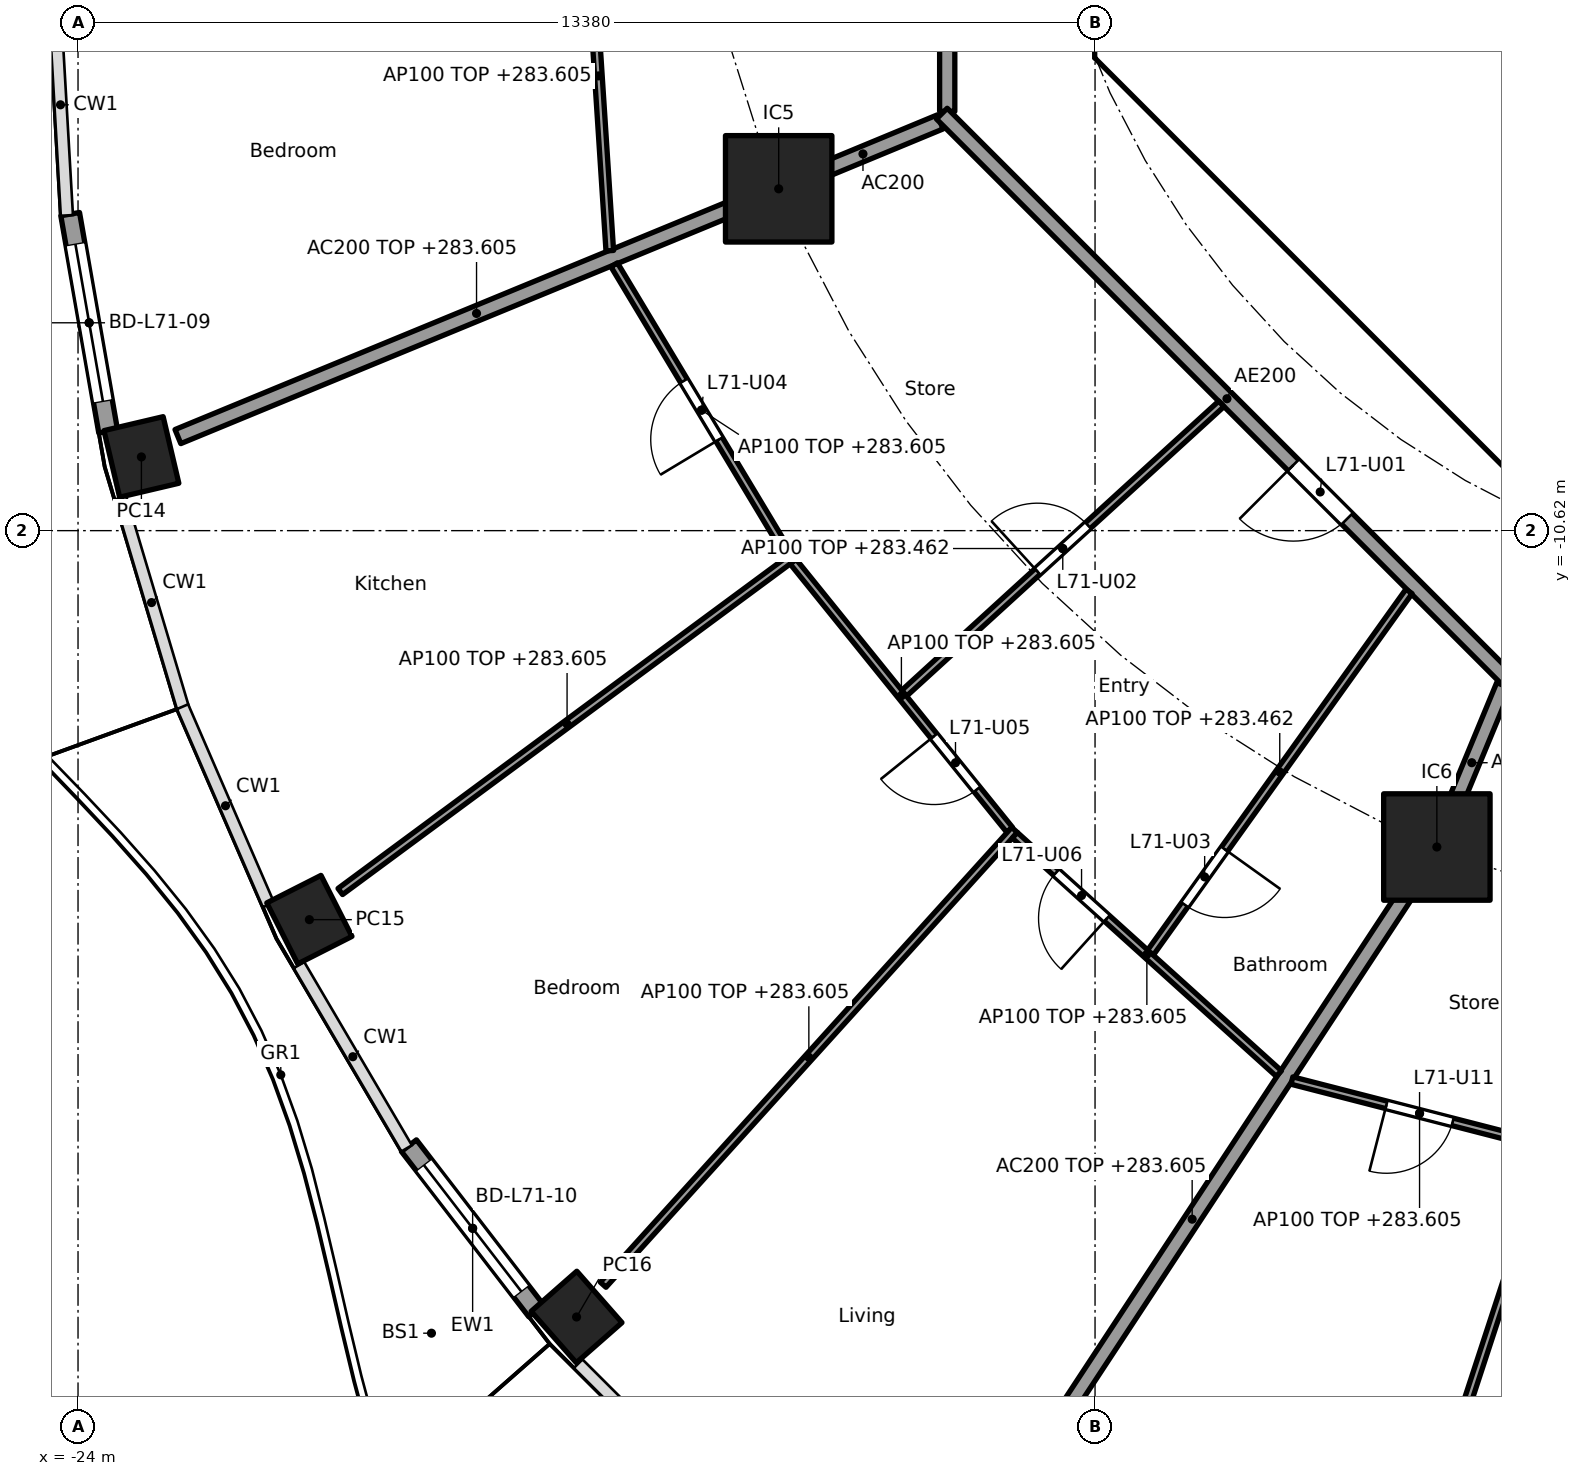
"""IFC4 building model, lengths in metres.
Left out: names, types, materials, properties, quantities, classifications, styles, units other than length and angle.
Written with IfcOpenShell. Run it as: python <this file> out.ifc"""

import sys

from ifc_helpers import new_model, si_unit, direction, frame, frame_2d, origin, origin_2d, place, context, subcontext, project, spatial, polyline, rectangle, hollow_rectangle, outline, extrude, element, fill, save


model = new_model("IFC4")
c1 = context("Model", 3, precision=1e-05, world=origin(), true_north=direction((0.0, 1.0)))
c2 = subcontext(c1, "Body", "Model", "MODEL_VIEW")
j1 = project(units=[si_unit("LENGTHUNIT", "METRE"), si_unit("PLANEANGLEUNIT", "RADIAN")], contexts=[c1])
p1 = place(None, origin())
s1 = spatial("IfcSite", under=j1, at=p1, CompositionType="ELEMENT")
p2 = place(p1, origin())
s2 = spatial("IfcBuilding", under=s1, at=p2, CompositionType="ELEMENT")
p3 = place(p2, frame((0.0, 0.0, 280.7)))
s3 = spatial("IfcBuildingStorey", under=s2, at=p3, CompositionType="ELEMENT", Elevation=280.7)
for number, where, z_axis, x_axis in (
    (1, (-23.166, -9.65, 0.0), (0.0, 0.0, 1.0), (0.229, -0.973, 0.0)),
    (2, (-20.957, -15.738, 0.0), (0.0, 0.0, 1.0), (0.452, -0.892, 0.0)),
    (3, (-17.441, -20.965, 0.0), (0.0, 0.0, 1.0), (0.66, -0.751, 0.0)),
):
    element("IfcColumn", number, at=place(p3, frame(where, z_axis=z_axis, x_axis=x_axis)), inside=s3, PredefinedType="COLUMN", context=c2, shape_type="SweptSolid", body=[
        extrude(hollow_rectangle(XDim=0.9, YDim=0.8, WallThickness=0.028, at=origin_2d()), origin(), (0.0, 0.0, 1.0), 3.7),
    ])
for number, where, z_axis, x_axis in (
    (4, (-14.782, -6.123, 0.0), (0.0, 0.0, 1.0), (1.0, 0.0, 0.0)),
    (5, (-6.123, -14.782, 0.0), (0.0, 0.0, 1.0), (1.0, 0.0, 0.0)),
):
    element("IfcColumn", number, at=place(p3, frame(where, z_axis=z_axis, x_axis=x_axis)), inside=s3, PredefinedType="COLUMN", context=c2, shape_type="SweptSolid", body=[
        extrude(rectangle(XDim=1.4, YDim=1.4, at=origin_2d()), origin(), (0.0, 0.0, 1.0), 3.7),
    ])
p4 = place(p3, frame((-23.604, -9.315, 0.0), z_axis=(0.0, 0.0, 1.0), x_axis=(-0.172182411767, 0.985065082661, 0.0)))
e6 = element("IfcWall", 6, at=p4, inside=s3, PredefinedType="SOLIDWALL", context=c2, shape_type="SweptSolid", body=[
    extrude(rectangle(XDim=2.903, YDim=0.25, at=frame_2d((1.451, 0.0))), origin(), (0.0, 0.0, 1.0), 3.44),
])
p5 = place(p4, frame((0.401, 0.0, 0.0)))
e7 = element("IfcOpeningElement", 7, at=p5, cuts=e6, PredefinedType="OPENING", context=c2, shape_type="SweptSolid", body=[
    extrude(rectangle(XDim=2.1, YDim=2.4, at=frame_2d((1.05, 1.2))), frame((0.0, 0.135, 0.0), z_axis=(0.0, -1.0, 0.0), x_axis=(1.0, 0.0, 0.0)), (0.0, 0.0, 1.0), 0.27),
])
p6 = place(p3, frame((-17.97, -20.886, 0.0), z_axis=(0.0, 0.0, 1.0), x_axis=(-0.610432336622, 0.792068407656, 0.0)))
e8 = element("IfcWall", 8, at=p6, inside=s3, PredefinedType="SOLIDWALL", context=c2, shape_type="SweptSolid", body=[
    extrude(rectangle(XDim=2.746, YDim=0.25, at=frame_2d((1.373, 0.0))), origin(), (0.0, 0.0, 1.0), 3.44),
])
p7 = place(p6, frame((0.323, 0.0, 0.0)))
e9 = element("IfcOpeningElement", 9, at=p7, cuts=e8, PredefinedType="OPENING", context=c2, shape_type="SweptSolid", body=[
    extrude(rectangle(XDim=2.1, YDim=2.4, at=frame_2d((1.05, 1.2))), frame((0.0, 0.135, 0.0), z_axis=(0.0, -1.0, 0.0), x_axis=(1.0, 0.0, 0.0)), (0.0, 0.0, 1.0), 0.27),
])
p8 = place(p3, frame((-9.988, -4.613, 0.0), z_axis=(0.0, 0.0, 1.0), x_axis=(0.707106781187, -0.707106781187, 0.0)))
e10 = element("IfcWall", 10, at=p8, inside=s3, PredefinedType="SHEAR", context=c2, shape_type="SweptSolid", body=[
    extrude(rectangle(XDim=7.602, YDim=0.6, at=frame_2d((3.801, 0.0))), origin(), (0.0, 0.0, 1.0), 3.44),
])
p9 = place(p8, frame((6.151, 0.0, 0.0)))
e11 = element("IfcOpeningElement", 11, at=p9, cuts=e10, PredefinedType="OPENING", context=c2, shape_type="SweptSolid", body=[
    extrude(rectangle(XDim=1.1, YDim=2.1, at=frame_2d((0.55, 1.05))), frame((0.0, 0.31, 0.0), z_axis=(0.0, -1.0, 0.0), x_axis=(1.0, 0.0, 0.0)), (0.0, 0.0, 1.0), 0.62),
])
p10 = place(p3, frame((-6.2, -7.827, 0.0), z_axis=(0.0, 0.0, 1.0), x_axis=(0.0, 1.0, 0.0)))
e12 = element("IfcWall", 12, at=p10, inside=s3, PredefinedType="PARTITIONING", context=c2, shape_type="SweptSolid", body=[
    extrude(rectangle(XDim=3.527, YDim=0.15, at=frame_2d((1.763, 0.0))), origin(), (0.0, 0.0, 1.0), 3.44),
])
p11 = place(p10, frame((2.365, 0.0, 0.0)))
e13 = element("IfcOpeningElement", 13, at=p11, cuts=e12, PredefinedType="OPENING", context=c2, shape_type="SweptSolid", body=[
    extrude(rectangle(XDim=0.9, YDim=2.1, at=frame_2d((0.45, 1.05))), frame((0.0, 0.085, 0.0), z_axis=(0.0, -1.0, 0.0), x_axis=(1.0, 0.0, 0.0)), (0.0, 0.0, 1.0), 0.17),
])
p12 = place(p10, frame((0.489, 0.0, 0.0)))
e14 = element("IfcOpeningElement", 14, at=p12, cuts=e12, PredefinedType="OPENING", context=c2, shape_type="SweptSolid", body=[
    extrude(rectangle(XDim=0.9, YDim=2.1, at=frame_2d((0.45, 1.05))), frame((0.0, 0.085, 0.0), z_axis=(0.0, -1.0, 0.0), x_axis=(1.0, 0.0, 0.0)), (0.0, 0.0, 1.0), 0.17),
])
p13 = place(p3, origin())
e15 = element("IfcWall", 15, at=p13, inside=s3, PredefinedType="SHEAR", context=c2, shape_type="SweptSolid", body=[
    extrude(outline(polyline([(-10.625, -3.801), (-10.025, -3.801), (-10.025, -4.152), (-9.776, -4.401), (-10.2, -4.825), (-10.625, -4.401), (-10.625, -3.801)])), origin(), (0.0, 0.0, 1.0), 3.44),
])
p14 = place(p3, frame((-8.301, -5.8, 0.0), z_axis=(0.0, 0.0, 1.0), x_axis=(1.0, 0.0, 0.0)))
e16 = element("IfcWall", 16, at=p14, inside=s3, PredefinedType="PARTITIONING", context=c2, shape_type="SweptSolid", body=[
    extrude(rectangle(XDim=2.026, YDim=0.15, at=frame_2d((1.013, 0.0))), origin(), (0.0, 0.0, 1.0), 3.44),
])
p15 = place(p3, frame((-12.657, -5.243, 0.0), z_axis=(0.0, 0.0, 1.0), x_axis=(-0.923859888513, -0.38273085373, 0.0)))
e17 = element("IfcWall", 17, at=p15, inside=s3, PredefinedType="PARTITIONING", context=c2, shape_type="SweptSolid", body=[
    extrude(rectangle(XDim=2.199, YDim=0.2, at=frame_2d((1.1, 0.0))), origin(), (0.0, 0.0, 1.0), 3.44),
])
p16 = place(p3, frame((-14.828, -6.142, 0.0), z_axis=(0.0, 0.0, 1.0), x_axis=(-0.924478087429, -0.381235184451, 0.0)))
e18 = element("IfcWall", 18, at=p16, inside=s3, PredefinedType="PARTITIONING", context=c2, shape_type="SweptSolid", body=[
    extrude(rectangle(XDim=8.499, YDim=0.2, at=frame_2d((4.25, 0.0))), origin(), (0.0, 0.0, 1.0), 2.905),
])
p17 = place(p3, frame((-5.243, -12.657, 0.0), z_axis=(0.0, 0.0, 1.0), x_axis=(-0.382770106157, -0.923843626288, 0.0)))
e19 = element("IfcWall", 19, at=p17, inside=s3, PredefinedType="PARTITIONING", context=c2, shape_type="SweptSolid", body=[
    extrude(rectangle(XDim=2.199, YDim=0.2, at=frame_2d((1.1, 0.0))), origin(), (0.0, 0.0, 1.0), 3.44),
])
p18 = place(p3, frame((-6.151, -14.824, 0.0), z_axis=(0.0, 0.0, 1.0), x_axis=(-0.549345577828, -0.835595258556, 0.0)))
e20 = element("IfcWall", 20, at=p18, inside=s3, PredefinedType="PARTITIONING", context=c2, shape_type="SweptSolid", body=[
    extrude(rectangle(XDim=11.62, YDim=0.2, at=frame_2d((5.81, 0.0))), origin(), (0.0, 0.0, 1.0), 2.905),
])
p19 = place(p3, frame((-12.565, 5.304, 0.0), z_axis=(0.0, 0.0, 1.0), x_axis=(0.0, -1.0, 0.0)))
e21 = element("IfcWall", 21, at=p19, inside=s3, PredefinedType="PARTITIONING", context=c2, shape_type="SweptSolid", body=[
    extrude(rectangle(XDim=10.409, YDim=0.2, at=frame_2d((5.205, 0.0))), origin(), (0.0, 0.0, 1.0), 3.44),
])
p20 = place(p19, frame((4.804, 0.0, 0.0)))
e22 = element("IfcOpeningElement", 22, at=p20, cuts=e21, PredefinedType="OPENING", context=c2, shape_type="SweptSolid", body=[
    extrude(rectangle(XDim=1.0, YDim=2.1, at=frame_2d((0.5, 1.05))), frame((0.0, 0.11, 0.0), z_axis=(0.0, -1.0, 0.0), x_axis=(1.0, 0.0, 0.0)), (0.0, 0.0, 1.0), 0.22),
])
p21 = place(p3, frame((-12.635, -5.134, 0.0), z_axis=(0.0, 0.0, 1.0), x_axis=(0.707106781187, -0.707106781187, 0.0)))
e23 = element("IfcWall", 23, at=p21, inside=s3, PredefinedType="PARTITIONING", context=c2, shape_type="SweptSolid", body=[
    extrude(rectangle(XDim=10.609, YDim=0.2, at=frame_2d((5.305, 0.0))), origin(), (0.0, 0.0, 1.0), 3.44),
])
p22 = place(p21, frame((6.539, 0.0, 0.0)))
e24 = element("IfcOpeningElement", 24, at=p22, cuts=e23, PredefinedType="OPENING", context=c2, shape_type="SweptSolid", body=[
    extrude(rectangle(XDim=1.0, YDim=2.1, at=frame_2d((0.5, 1.05))), frame((0.0, 0.11, 0.0), z_axis=(0.0, -1.0, 0.0), x_axis=(1.0, 0.0, 0.0)), (0.0, 0.0, 1.0), 0.22),
])
p23 = place(p3, frame((-17.304, -2.338, 0.0), z_axis=(0.0, 0.0, 1.0), x_axis=(0.06500001157, -0.997885263192, 0.0)))
e25 = element("IfcWall", 25, at=p23, inside=s3, PredefinedType="PARTITIONING", context=c2, shape_type="SweptSolid", body=[
    extrude(rectangle(XDim=4.609, YDim=0.1, at=frame_2d((2.304, 0.0))), origin(), (0.0, 0.0, 1.0), 2.905),
])
p24 = place(p3, frame((-16.946, -7.122, 0.0), z_axis=(0.0, 0.0, 1.0), x_axis=(0.514994556856, -0.857193447483, 0.0)))
e26 = element("IfcWall", 26, at=p24, inside=s3, PredefinedType="PARTITIONING", context=c2, shape_type="SweptSolid", body=[
    extrude(rectangle(XDim=4.462, YDim=0.1, at=frame_2d((2.231, 0.0))), origin(), (0.0, 0.0, 1.0), 2.905),
])
p25 = place(p24, frame((1.781, 0.0, 0.0)))
e27 = element("IfcOpeningElement", 27, at=p25, cuts=e26, PredefinedType="OPENING", context=c2, shape_type="SweptSolid", body=[
    extrude(rectangle(XDim=0.9, YDim=2.1, at=frame_2d((0.45, 1.05))), frame((0.0, 0.06, 0.0), z_axis=(0.0, -1.0, 0.0), x_axis=(1.0, 0.0, 0.0)), (0.0, 0.0, 1.0), 0.12),
])
p26 = place(p3, frame((-14.582, -10.96, 0.0), z_axis=(0.0, 0.0, 1.0), x_axis=(-0.804405200554, -0.594081032623, 0.0)))
e28 = element("IfcWall", 28, at=p26, inside=s3, PredefinedType="PARTITIONING", context=c2, shape_type="SweptSolid", body=[
    extrude(rectangle(XDim=7.418, YDim=0.1, at=frame_2d((3.709, 0.0))), origin(), (0.0, 0.0, 1.0), 2.905),
])
p27 = place(p3, frame((-14.591, -11.029, 0.0), z_axis=(0.0, 0.0, 1.0), x_axis=(0.628170338674, -0.778075848237, 0.0)))
e29 = element("IfcWall", 29, at=p27, inside=s3, PredefinedType="PARTITIONING", context=c2, shape_type="SweptSolid", body=[
    extrude(rectangle(XDim=4.532, YDim=0.1, at=frame_2d((2.266, 0.0))), origin(), (0.0, 0.0, 1.0), 2.905),
])
p28 = place(p27, frame((2.949, 0.0, 0.0)))
e30 = element("IfcOpeningElement", 30, at=p28, cuts=e29, PredefinedType="OPENING", context=c2, shape_type="SweptSolid", body=[
    extrude(rectangle(XDim=0.9, YDim=2.1, at=frame_2d((0.45, 1.05))), frame((0.0, 0.06, 0.0), z_axis=(0.0, -1.0, 0.0), x_axis=(1.0, 0.0, 0.0)), (0.0, 0.0, 1.0), 0.12),
])
p29 = place(p3, frame((-8.958, -8.952, 0.0), z_axis=(0.0, 0.0, 1.0), x_axis=(-0.73876526954, -0.673962815385, 0.0)))
e31 = element("IfcWall", 31, at=p29, inside=s3, PredefinedType="PARTITIONING", context=c2, shape_type="SweptSolid", body=[
    extrude(rectangle(XDim=5.647, YDim=0.1, at=frame_2d((2.824, 0.0))), origin(), (0.0, 0.0, 1.0), 2.762),
])
p30 = place(p29, frame((2.374, 0.0, 0.0)))
e32 = element("IfcOpeningElement", 32, at=p30, cuts=e31, PredefinedType="OPENING", context=c2, shape_type="SweptSolid", body=[
    extrude(rectangle(XDim=0.9, YDim=2.1, at=frame_2d((0.45, 1.05))), frame((0.0, 0.06, 0.0), z_axis=(0.0, -1.0, 0.0), x_axis=(1.0, 0.0, 0.0)), (0.0, 0.0, 1.0), 0.12),
])
p31 = place(p3, frame((-11.679, -14.557, 0.0), z_axis=(0.0, 0.0, 1.0), x_axis=(-0.670800011545, -0.741638284146, 0.0)))
e33 = element("IfcWall", 33, at=p31, inside=s3, PredefinedType="PARTITIONING", context=c2, shape_type="SweptSolid", body=[
    extrude(rectangle(XDim=8.068, YDim=0.1, at=frame_2d((4.034, 0.0))), origin(), (0.0, 0.0, 1.0), 2.905),
])
p32 = place(p3, frame((-11.676, -14.628, 0.0), z_axis=(0.0, 0.0, 1.0), x_axis=(0.74245829867, -0.669892285921, 0.0)))
e34 = element("IfcWall", 34, at=p32, inside=s3, PredefinedType="PARTITIONING", context=c2, shape_type="SweptSolid", body=[
    extrude(rectangle(XDim=4.68, YDim=0.1, at=frame_2d((2.34, 0.0))), origin(), (0.0, 0.0, 1.0), 2.905),
])
p33 = place(p32, frame((0.732, 0.0, 0.0)))
e35 = element("IfcOpeningElement", 35, at=p33, cuts=e34, PredefinedType="OPENING", context=c2, shape_type="SweptSolid", body=[
    extrude(rectangle(XDim=0.9, YDim=2.1, at=frame_2d((0.45, 1.05))), frame((0.0, 0.06, 0.0), z_axis=(0.0, -1.0, 0.0), x_axis=(1.0, 0.0, 0.0)), (0.0, 0.0, 1.0), 0.12),
])
p34 = place(p3, frame((-6.49, -11.419, 0.0), z_axis=(0.0, 0.0, 1.0), x_axis=(-0.58201647594, -0.813176992871, 0.0)))
e36 = element("IfcWall", 36, at=p34, inside=s3, PredefinedType="PARTITIONING", context=c2, shape_type="SweptSolid", body=[
    extrude(rectangle(XDim=5.844, YDim=0.1, at=frame_2d((2.922, 0.0))), origin(), (0.0, 0.0, 1.0), 2.762),
])
p35 = place(p34, frame((4.169, 0.0, 0.0)))
e37 = element("IfcOpeningElement", 37, at=p35, cuts=e36, PredefinedType="OPENING", context=c2, shape_type="SweptSolid", body=[
    extrude(rectangle(XDim=0.9, YDim=2.1, at=frame_2d((0.45, 1.05))), frame((0.0, 0.06, 0.0), z_axis=(0.0, -1.0, 0.0), x_axis=(1.0, 0.0, 0.0)), (0.0, 0.0, 1.0), 0.12),
])
p36 = place(p3, frame((-8.03, -17.854, 0.0), z_axis=(0.0, 0.0, 1.0), x_axis=(0.968441967324, -0.249239154077, 0.0)))
e38 = element("IfcWall", 38, at=p36, inside=s3, PredefinedType="PARTITIONING", context=c2, shape_type="SweptSolid", body=[
    extrude(rectangle(XDim=3.468, YDim=0.1, at=frame_2d((1.734, 0.0))), origin(), (0.0, 0.0, 1.0), 2.905),
])
p37 = place(p36, frame((1.284, 0.0, 0.0)))
e39 = element("IfcOpeningElement", 39, at=p37, cuts=e38, PredefinedType="OPENING", context=c2, shape_type="SweptSolid", body=[
    extrude(rectangle(XDim=0.9, YDim=2.1, at=frame_2d((0.45, 1.05))), frame((0.0, 0.06, 0.0), z_axis=(0.0, -1.0, 0.0), x_axis=(1.0, 0.0, 0.0)), (0.0, 0.0, 1.0), 0.12),
])
p38 = place(p3, frame((-2.633, -12.66, 0.0), z_axis=(0.0, 0.0, 1.0), x_axis=(-0.311432955908, -0.950268127412, 0.0)))
e40 = element("IfcWall", 40, at=p38, inside=s3, PredefinedType="PARTITIONING", context=c2, shape_type="SweptSolid", body=[
    extrude(rectangle(XDim=15.074, YDim=0.1, at=frame_2d((7.537, 0.0))), origin(), (0.0, 0.0, 1.0), 2.762),
])
p39 = place(p38, frame((0.829, 0.0, 0.0)))
e41 = element("IfcOpeningElement", 41, at=p39, cuts=e40, PredefinedType="OPENING", context=c2, shape_type="SweptSolid", body=[
    extrude(rectangle(XDim=0.9, YDim=2.1, at=frame_2d((0.45, 1.05))), frame((0.0, 0.06, 0.0), z_axis=(0.0, -1.0, 0.0), x_axis=(1.0, 0.0, 0.0)), (0.0, 0.0, 1.0), 0.12),
])
p40 = place(p5, origin())
e42 = element("IfcDoor", 42, at=p40, inside=s3, OperationType="SLIDING_TO_LEFT", PredefinedType="DOOR", context=c2, shape_type="SweptSolid", body=[
    extrude(rectangle(XDim=2.1, YDim=2.4, at=frame_2d((1.05, 1.2))), frame((0.0, 0.025, 0.0), z_axis=(0.0, -1.0, 0.0), x_axis=(1.0, 0.0, 0.0)), (0.0, 0.0, 1.0), 0.05),
])
fill(e7, e42)
p41 = place(p7, origin())
e43 = element("IfcDoor", 43, at=p41, inside=s3, OperationType="SLIDING_TO_LEFT", PredefinedType="DOOR", context=c2, shape_type="SweptSolid", body=[
    extrude(rectangle(XDim=2.1, YDim=2.4, at=frame_2d((1.05, 1.2))), frame((0.0, 0.025, 0.0), z_axis=(0.0, -1.0, 0.0), x_axis=(1.0, 0.0, 0.0)), (0.0, 0.0, 1.0), 0.05),
])
fill(e9, e43)
p42 = place(p11, origin())
e44 = element("IfcDoor", 44, at=p42, inside=s3, OperationType="SINGLE_SWING_LEFT", PredefinedType="DOOR", context=c2, shape_type="SweptSolid", body=[
    extrude(rectangle(XDim=0.9, YDim=2.1, at=frame_2d((0.45, 1.05))), frame((0.0, 0.025, 0.0), z_axis=(0.0, -1.0, 0.0), x_axis=(1.0, 0.0, 0.0)), (0.0, 0.0, 1.0), 0.05),
])
fill(e13, e44)
p43 = place(p12, origin())
e45 = element("IfcDoor", 45, at=p43, inside=s3, OperationType="SINGLE_SWING_LEFT", PredefinedType="DOOR", context=c2, shape_type="SweptSolid", body=[
    extrude(rectangle(XDim=0.9, YDim=2.1, at=frame_2d((0.45, 1.05))), frame((0.0, 0.025, 0.0), z_axis=(0.0, -1.0, 0.0), x_axis=(1.0, 0.0, 0.0)), (0.0, 0.0, 1.0), 0.05),
])
fill(e14, e45)
p44 = place(p9, origin())
e46 = element("IfcDoor", 46, at=p44, inside=s3, OperationType="SINGLE_SWING_RIGHT", PredefinedType="DOOR", context=c2, shape_type="SweptSolid", body=[
    extrude(rectangle(XDim=1.1, YDim=2.1, at=frame_2d((0.55, 1.05))), frame((0.0, 0.025, 0.0), z_axis=(0.0, -1.0, 0.0), x_axis=(1.0, 0.0, 0.0)), (0.0, 0.0, 1.0), 0.05),
])
fill(e11, e46)
p45 = place(p22, frame((1.0, 0.0, 0.0), x_axis=(-1.0, 0.0, 0.0)))
e47 = element("IfcDoor", 47, at=p45, inside=s3, OperationType="SINGLE_SWING_RIGHT", PredefinedType="DOOR", context=c2, shape_type="SweptSolid", body=[
    extrude(rectangle(XDim=1.0, YDim=2.1, at=frame_2d((0.5, 1.05))), frame((0.0, 0.025, 0.0), z_axis=(0.0, -1.0, 0.0), x_axis=(1.0, 0.0, 0.0)), (0.0, 0.0, 1.0), 0.05),
])
fill(e24, e47)
p46 = place(p30, frame((0.9, 0.0, 0.0), x_axis=(-1.0, 0.0, 0.0)))
e48 = element("IfcDoor", 48, at=p46, inside=s3, OperationType="SINGLE_SWING_LEFT", PredefinedType="DOOR", context=c2, shape_type="SweptSolid", body=[
    extrude(rectangle(XDim=0.9, YDim=2.1, at=frame_2d((0.45, 1.05))), frame((0.0, 0.025, 0.0), z_axis=(0.0, -1.0, 0.0), x_axis=(1.0, 0.0, 0.0)), (0.0, 0.0, 1.0), 0.05),
])
fill(e32, e48)
p47 = place(p35, origin())
e49 = element("IfcDoor", 49, at=p47, inside=s3, OperationType="SINGLE_SWING_LEFT", PredefinedType="DOOR", context=c2, shape_type="SweptSolid", body=[
    extrude(rectangle(XDim=0.9, YDim=2.1, at=frame_2d((0.45, 1.05))), frame((0.0, 0.025, 0.0), z_axis=(0.0, -1.0, 0.0), x_axis=(1.0, 0.0, 0.0)), (0.0, 0.0, 1.0), 0.05),
])
fill(e37, e49)
p48 = place(p25, frame((0.9, 0.0, 0.0), x_axis=(-1.0, 0.0, 0.0)))
e50 = element("IfcDoor", 50, at=p48, inside=s3, OperationType="SINGLE_SWING_LEFT", PredefinedType="DOOR", context=c2, shape_type="SweptSolid", body=[
    extrude(rectangle(XDim=0.9, YDim=2.1, at=frame_2d((0.45, 1.05))), frame((0.0, 0.025, 0.0), z_axis=(0.0, -1.0, 0.0), x_axis=(1.0, 0.0, 0.0)), (0.0, 0.0, 1.0), 0.05),
])
fill(e27, e50)
p49 = place(p28, frame((0.9, 0.0, 0.0), x_axis=(-1.0, 0.0, 0.0)))
e51 = element("IfcDoor", 51, at=p49, inside=s3, OperationType="SINGLE_SWING_RIGHT", PredefinedType="DOOR", context=c2, shape_type="SweptSolid", body=[
    extrude(rectangle(XDim=0.9, YDim=2.1, at=frame_2d((0.45, 1.05))), frame((0.0, 0.025, 0.0), z_axis=(0.0, -1.0, 0.0), x_axis=(1.0, 0.0, 0.0)), (0.0, 0.0, 1.0), 0.05),
])
fill(e30, e51)
p50 = place(p33, frame((0.9, 0.0, 0.0), x_axis=(-1.0, 0.0, 0.0)))
e52 = element("IfcDoor", 52, at=p50, inside=s3, OperationType="SINGLE_SWING_LEFT", PredefinedType="DOOR", context=c2, shape_type="SweptSolid", body=[
    extrude(rectangle(XDim=0.9, YDim=2.1, at=frame_2d((0.45, 1.05))), frame((0.0, 0.025, 0.0), z_axis=(0.0, -1.0, 0.0), x_axis=(1.0, 0.0, 0.0)), (0.0, 0.0, 1.0), 0.05),
])
fill(e35, e52)
p51 = place(p37, frame((0.9, 0.0, 0.0), x_axis=(-1.0, 0.0, 0.0)))
e53 = element("IfcDoor", 53, at=p51, inside=s3, OperationType="SINGLE_SWING_RIGHT", PredefinedType="DOOR", context=c2, shape_type="SweptSolid", body=[
    extrude(rectangle(XDim=0.9, YDim=2.1, at=frame_2d((0.45, 1.05))), frame((0.0, 0.025, 0.0), z_axis=(0.0, -1.0, 0.0), x_axis=(1.0, 0.0, 0.0)), (0.0, 0.0, 1.0), 0.05),
])
fill(e39, e53)
save(model, sys.argv[1])
